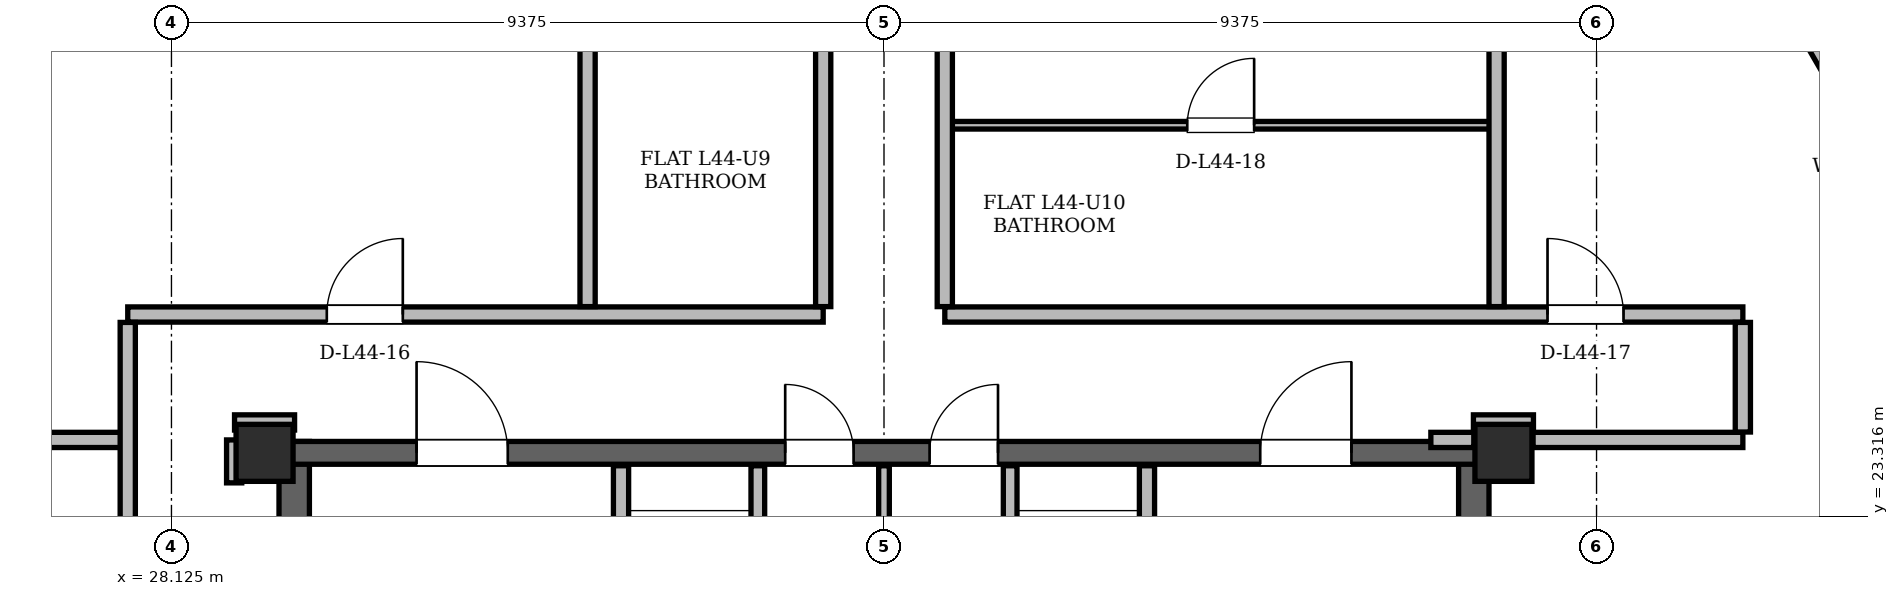
"""IFC4 building model, lengths in metres.
Left out: names, types, materials, properties, quantities, classifications, styles, units other than length and angle.
Written with IfcOpenShell. Run it as: python <this file> out.ifc"""

import sys

from ifc_helpers import new_model, si_unit, direction, frame, frame_2d, origin, origin_2d, place, context, subcontext, project, spatial, rectangle, hollow_rectangle, extrude, element, fill, save


model = new_model("IFC4")
c1 = context("Model", 3, precision=1e-05, world=origin(), true_north=direction((0.0, 1.0)))
c2 = subcontext(c1, "Body", "Model", "MODEL_VIEW")
j1 = project(units=[si_unit("LENGTHUNIT", "METRE"), si_unit("PLANEANGLEUNIT", "RADIAN")], contexts=[c1])
p1 = place(None, origin())
s1 = spatial("IfcSite", under=j1, at=p1, CompositionType="ELEMENT")
p2 = place(p1, origin())
s2 = spatial("IfcBuilding", under=s1, at=p2, CompositionType="ELEMENT")
p3 = place(p2, frame((0.0, 0.0, 167.4)))
s3 = spatial("IfcBuildingStorey", under=s2, at=p3, CompositionType="ELEMENT", Elevation=167.4)
for number, where, z_axis, x_axis in (
    (1, (45.65, 24.15, 0.0), (0.0, 0.0, 1.0), (1.0, 0.0, 0.0)),
    (2, (29.35, 24.15, 0.0), (0.0, 0.0, 1.0), (1.0, 0.0, 0.0)),
):
    element("IfcColumn", number, at=place(p3, frame(where, z_axis=z_axis, x_axis=x_axis)), inside=s3, PredefinedType="COLUMN", context=c2, shape_type="SweptSolid", body=[
        extrude(hollow_rectangle(XDim=0.75, YDim=0.75, WallThickness=0.06, at=origin_2d()), origin(), (0.0, 0.0, 1.0), 3.6),
    ])
for number, where, z_axis, x_axis in (
    (3, (29.74, 11.0, 0.0), (0.0, 0.0, 1.0), (0.0, 1.0, 0.0)),
    (4, (45.26, 11.0, 0.0), (0.0, 0.0, 1.0), (0.0, 1.0, 0.0)),
):
    element("IfcWall", number, at=place(p3, frame(where, z_axis=z_axis, x_axis=x_axis)), inside=s3, PredefinedType="SHEAR", context=c2, shape_type="SweptSolid", body=[
        extrude(rectangle(XDim=13.3, YDim=0.4, at=frame_2d((6.65, 0.0))), origin(), (0.0, 0.0, 1.0), 3.38),
    ])
p4 = place(p3, frame((29.65, 24.15, 0.0), z_axis=(0.0, 0.0, 1.0), x_axis=(1.0, 0.0, 0.0)))
e5 = element("IfcWall", 5, at=p4, inside=s3, PredefinedType="SHEAR", context=c2, shape_type="SweptSolid", body=[
    extrude(rectangle(XDim=15.7, YDim=0.3, at=frame_2d((7.85, 0.0))), origin(), (0.0, 0.0, 1.0), 3.38),
])
p5 = place(p4, frame((1.7, 0.0, 0.0)))
e6 = element("IfcOpeningElement", 6, at=p5, cuts=e5, PredefinedType="OPENING", context=c2, shape_type="SweptSolid", body=[
    extrude(rectangle(XDim=1.2, YDim=2.2, at=frame_2d((0.6, 1.1))), frame((0.0, 0.15, 0.0), z_axis=(0.0, -1.0, 0.0), x_axis=(1.0, 0.0, 0.0)), (0.0, 0.0, 1.0), 0.3),
])
p6 = place(p4, frame((12.8, 0.0, 0.0)))
e7 = element("IfcOpeningElement", 7, at=p6, cuts=e5, PredefinedType="OPENING", context=c2, shape_type="SweptSolid", body=[
    extrude(rectangle(XDim=1.2, YDim=2.2, at=frame_2d((0.6, 1.1))), frame((0.0, 0.15, 0.0), z_axis=(0.0, -1.0, 0.0), x_axis=(1.0, 0.0, 0.0)), (0.0, 0.0, 1.0), 0.3),
])
p7 = place(p4, frame((6.55, 0.0, 0.0)))
e8 = element("IfcOpeningElement", 8, at=p7, cuts=e5, PredefinedType="OPENING", context=c2, shape_type="SweptSolid", body=[
    extrude(rectangle(XDim=0.9, YDim=2.05, at=frame_2d((0.45, 1.025))), frame((0.0, 0.15, 0.0), z_axis=(0.0, -1.0, 0.0), x_axis=(1.0, 0.0, 0.0)), (0.0, 0.0, 1.0), 0.3),
])
p8 = place(p4, frame((8.45, 0.0, 0.0)))
e9 = element("IfcOpeningElement", 9, at=p8, cuts=e5, PredefinedType="OPENING", context=c2, shape_type="SweptSolid", body=[
    extrude(rectangle(XDim=0.9, YDim=2.05, at=frame_2d((0.45, 1.025))), frame((0.0, 0.15, 0.0), z_axis=(0.0, -1.0, 0.0), x_axis=(1.0, 0.0, 0.0)), (0.0, 0.0, 1.0), 0.3),
])
p9 = place(p3, frame((59.756, 12.279, 0.0), z_axis=(0.0, 0.0, 1.0), x_axis=(-0.499997523705, 0.86602683347, 0.0)))
e10 = element("IfcWall", 10, at=p9, inside=s3, PredefinedType="SOLIDWALL", context=c2, shape_type="SweptSolid", body=[
    extrude(rectangle(XDim=35.802, YDim=0.29, at=frame_2d((17.901, 0.0))), origin(), (0.0, 0.0, 1.0), 2.6),
])
p10 = place(p9, frame((6.579, 0.0, 0.0)))
e11 = element("IfcOpeningElement", 11, at=p10, cuts=e10, PredefinedType="OPENING", context=c2, shape_type="SweptSolid", body=[
    extrude(rectangle(XDim=1.5, YDim=2.2, at=frame_2d((0.75, 1.1))), frame((0.0, 0.145, 0.0), z_axis=(0.0, -1.0, 0.0), x_axis=(1.0, 0.0, 0.0)), (0.0, 0.0, 1.0), 0.29),
])
p11 = place(p9, frame((26.158, 0.0, 0.0)))
e12 = element("IfcOpeningElement", 12, at=p11, cuts=e10, PredefinedType="OPENING", context=c2, shape_type="SweptSolid", body=[
    extrude(rectangle(XDim=1.3, YDim=2.2, at=frame_2d((0.65, 1.1))), frame((0.0, 0.145, 0.0), z_axis=(0.0, -1.0, 0.0), x_axis=(1.0, 0.0, 0.0)), (0.0, 0.0, 1.0), 0.29),
])
p12 = place(p9, frame((1.25, 0.0, 0.85)))
e13 = element("IfcOpeningElement", 13, at=p12, cuts=e10, PredefinedType="OPENING", context=c2, shape_type="SweptSolid", body=[
    extrude(rectangle(XDim=1.2, YDim=1.48, at=frame_2d((0.6, 0.74))), frame((0.0, 0.145, 0.0), z_axis=(0.0, -1.0, 0.0), x_axis=(1.0, 0.0, 0.0)), (0.0, 0.0, 1.0), 0.29),
])
p13 = place(p9, frame((17.033, 0.0, 0.85)))
e14 = element("IfcOpeningElement", 14, at=p13, cuts=e10, PredefinedType="OPENING", context=c2, shape_type="SweptSolid", body=[
    extrude(rectangle(XDim=2.6, YDim=1.64, at=frame_2d((1.3, 0.82))), frame((0.0, 0.145, 0.0), z_axis=(0.0, -1.0, 0.0), x_axis=(1.0, 0.0, 0.0)), (0.0, 0.0, 1.0), 0.29),
])
p14 = place(p9, frame((21.982, 0.0, 0.85)))
e15 = element("IfcOpeningElement", 15, at=p14, cuts=e10, PredefinedType="OPENING", context=c2, shape_type="SweptSolid", body=[
    extrude(rectangle(XDim=2.0, YDim=1.64, at=frame_2d((1.0, 0.82))), frame((0.0, 0.145, 0.0), z_axis=(0.0, -1.0, 0.0), x_axis=(1.0, 0.0, 0.0)), (0.0, 0.0, 1.0), 0.29),
])
p15 = place(p9, frame((13.347, 0.0, 0.85)))
e16 = element("IfcOpeningElement", 16, at=p15, cuts=e10, PredefinedType="OPENING", context=c2, shape_type="SweptSolid", body=[
    extrude(rectangle(XDim=1.6, YDim=1.64, at=frame_2d((0.8, 0.82))), frame((0.0, 0.145, 0.0), z_axis=(0.0, -1.0, 0.0), x_axis=(1.0, 0.0, 0.0)), (0.0, 0.0, 1.0), 0.29),
])
p16 = place(p9, frame((31.619, 0.0, 0.85)))
e17 = element("IfcOpeningElement", 17, at=p16, cuts=e10, PredefinedType="OPENING", context=c2, shape_type="SweptSolid", body=[
    extrude(rectangle(XDim=2.6, YDim=1.64, at=frame_2d((1.3, 0.82))), frame((0.0, 0.145, 0.0), z_axis=(0.0, -1.0, 0.0), x_axis=(1.0, 0.0, 0.0)), (0.0, 0.0, 1.0), 0.29),
])
p17 = place(p3, frame((33.146, 43.285, 0.0), z_axis=(0.0, 0.0, 1.0), x_axis=(-0.499997523705, -0.86602683347, 0.0)))
e18 = element("IfcWall", 18, at=p17, inside=s3, PredefinedType="SOLIDWALL", context=c2, shape_type="SweptSolid", body=[
    extrude(rectangle(XDim=35.802, YDim=0.29, at=frame_2d((17.901, 0.0))), origin(), (0.0, 0.0, 1.0), 2.6),
])
p18 = place(p17, frame((6.76, 0.0, 0.0)))
e19 = element("IfcOpeningElement", 19, at=p18, cuts=e18, PredefinedType="OPENING", context=c2, shape_type="SweptSolid", body=[
    extrude(rectangle(XDim=1.0, YDim=2.18, at=frame_2d((0.5, 1.09))), frame((0.0, 0.145, 0.0), z_axis=(0.0, -1.0, 0.0), x_axis=(1.0, 0.0, 0.0)), (0.0, 0.0, 1.0), 0.29),
])
p19 = place(p17, frame((26.688, 0.0, 0.0)))
e20 = element("IfcOpeningElement", 20, at=p19, cuts=e18, PredefinedType="OPENING", context=c2, shape_type="SweptSolid", body=[
    extrude(rectangle(XDim=1.5, YDim=2.2, at=frame_2d((0.75, 1.1))), frame((0.0, 0.145, 0.0), z_axis=(0.0, -1.0, 0.0), x_axis=(1.0, 0.0, 0.0)), (0.0, 0.0, 1.0), 0.29),
])
p20 = place(p17, frame((33.698, 0.0, 0.85)))
e21 = element("IfcOpeningElement", 21, at=p20, cuts=e18, PredefinedType="OPENING", context=c2, shape_type="SweptSolid", body=[
    extrude(rectangle(XDim=1.2, YDim=1.48, at=frame_2d((0.6, 0.74))), frame((0.0, 0.145, 0.0), z_axis=(0.0, -1.0, 0.0), x_axis=(1.0, 0.0, 0.0)), (0.0, 0.0, 1.0), 0.29),
])
p21 = place(p17, frame((22.123, 0.0, 0.85)))
e22 = element("IfcOpeningElement", 22, at=p21, cuts=e18, PredefinedType="OPENING", context=c2, shape_type="SweptSolid", body=[
    extrude(rectangle(XDim=1.2, YDim=1.48, at=frame_2d((0.6, 0.74))), frame((0.0, 0.145, 0.0), z_axis=(0.0, -1.0, 0.0), x_axis=(1.0, 0.0, 0.0)), (0.0, 0.0, 1.0), 0.29),
])
p22 = place(p17, frame((12.284, 0.0, 0.85)))
e23 = element("IfcOpeningElement", 23, at=p22, cuts=e18, PredefinedType="OPENING", context=c2, shape_type="SweptSolid", body=[
    extrude(rectangle(XDim=1.6, YDim=1.64, at=frame_2d((0.8, 0.82))), frame((0.0, 0.145, 0.0), z_axis=(0.0, -1.0, 0.0), x_axis=(1.0, 0.0, 0.0)), (0.0, 0.0, 1.0), 0.29),
])
p23 = place(p17, frame((17.539, 0.0, 0.85)))
e24 = element("IfcOpeningElement", 24, at=p23, cuts=e18, PredefinedType="OPENING", context=c2, shape_type="SweptSolid", body=[
    extrude(rectangle(XDim=3.0, YDim=1.64, at=frame_2d((1.5, 0.82))), frame((0.0, 0.145, 0.0), z_axis=(0.0, -1.0, 0.0), x_axis=(1.0, 0.0, 0.0)), (0.0, 0.0, 1.0), 0.29),
])
p24 = place(p17, frame((1.23, 0.0, 0.85)))
e25 = element("IfcOpeningElement", 25, at=p24, cuts=e18, PredefinedType="OPENING", context=c2, shape_type="SweptSolid", body=[
    extrude(rectangle(XDim=1.2, YDim=1.48, at=frame_2d((0.6, 0.74))), frame((0.0, 0.145, 0.0), z_axis=(0.0, -1.0, 0.0), x_axis=(1.0, 0.0, 0.0)), (0.0, 0.0, 1.0), 0.29),
])
p25 = place(p17, frame((30.487, 0.0, 0.85)))
e26 = element("IfcOpeningElement", 26, at=p25, cuts=e18, PredefinedType="OPENING", context=c2, shape_type="SweptSolid", body=[
    extrude(rectangle(XDim=1.2, YDim=1.48, at=frame_2d((0.6, 0.74))), frame((0.0, 0.145, 0.0), z_axis=(0.0, -1.0, 0.0), x_axis=(1.0, 0.0, 0.0)), (0.0, 0.0, 1.0), 0.29),
])
p26 = place(p3, frame((34.04, 19.48, 0.0), z_axis=(0.0, 0.0, 1.0), x_axis=(0.0, 1.0, 0.0)))
e27 = element("IfcWall", 27, at=p26, inside=s3, PredefinedType="PARTITIONING", context=c2, shape_type="SweptSolid", body=[
    extrude(rectangle(XDim=4.5, YDim=0.2, at=frame_2d((2.25, 0.0))), origin(), (0.0, 0.0, 1.0), 3.38),
])
p27 = place(p26, frame((2.12, 0.0, 0.0)))
e28 = element("IfcOpeningElement", 28, at=p27, cuts=e27, PredefinedType="OPENING", context=c2, shape_type="SweptSolid", body=[
    extrude(rectangle(XDim=1.1, YDim=2.2, at=frame_2d((0.55, 1.1))), frame((0.0, 0.1, 0.0), z_axis=(0.0, -1.0, 0.0), x_axis=(1.0, 0.0, 0.0)), (0.0, 0.0, 1.0), 0.2),
])
p28 = place(p3, frame((35.84, 20.96, 0.0), z_axis=(0.0, 0.0, 1.0), x_axis=(0.0, 1.0, 0.0)))
e29 = element("IfcWall", 29, at=p28, inside=s3, PredefinedType="PARTITIONING", context=c2, shape_type="SweptSolid", body=[
    extrude(rectangle(XDim=3.02, YDim=0.18, at=frame_2d((1.51, 0.0))), origin(), (0.0, 0.0, 1.0), 3.38),
])
p29 = place(p3, frame((40.96, 19.48, 0.0), z_axis=(0.0, 0.0, 1.0), x_axis=(0.0, 1.0, 0.0)))
e30 = element("IfcWall", 30, at=p29, inside=s3, PredefinedType="PARTITIONING", context=c2, shape_type="SweptSolid", body=[
    extrude(rectangle(XDim=4.5, YDim=0.2, at=frame_2d((2.25, 0.0))), origin(), (0.0, 0.0, 1.0), 3.38),
])
p30 = place(p29, frame((2.12, 0.0, 0.0)))
e31 = element("IfcOpeningElement", 31, at=p30, cuts=e30, PredefinedType="OPENING", context=c2, shape_type="SweptSolid", body=[
    extrude(rectangle(XDim=1.1, YDim=2.2, at=frame_2d((0.55, 1.1))), frame((0.0, 0.1, 0.0), z_axis=(0.0, -1.0, 0.0), x_axis=(1.0, 0.0, 0.0)), (0.0, 0.0, 1.0), 0.2),
])
p31 = place(p3, frame((39.16, 20.96, 0.0), z_axis=(0.0, 0.0, 1.0), x_axis=(0.0, 1.0, 0.0)))
e32 = element("IfcWall", 32, at=p31, inside=s3, PredefinedType="PARTITIONING", context=c2, shape_type="SweptSolid", body=[
    extrude(rectangle(XDim=3.02, YDim=0.18, at=frame_2d((1.51, 0.0))), origin(), (0.0, 0.0, 1.0), 3.38),
])
p32 = place(p3, frame((37.5, 21.06, 0.0), z_axis=(0.0, 0.0, 1.0), x_axis=(0.0, 1.0, 0.0)))
e33 = element("IfcWall", 33, at=p32, inside=s3, PredefinedType="PARTITIONING", context=c2, shape_type="SweptSolid", body=[
    extrude(rectangle(XDim=2.92, YDim=0.14, at=frame_2d((1.46, 0.0))), origin(), (0.0, 0.0, 1.0), 3.38),
])
p33 = place(p3, frame((22.368, 24.32, 0.0), z_axis=(0.0, 0.0, 1.0), x_axis=(1.0, 0.0, 0.0)))
e34 = element("IfcWall", 34, at=p33, inside=s3, PredefinedType="PARTITIONING", context=c2, shape_type="SweptSolid", body=[
    extrude(rectangle(XDim=5.182, YDim=0.2, at=frame_2d((2.591, 0.0))), origin(), (0.0, 0.0, 1.0), 3.38),
])
p34 = place(p3, frame((44.695, 24.32, 0.0), z_axis=(0.0, 0.0, 1.0), x_axis=(1.0, 0.0, 0.0)))
e35 = element("IfcWall", 35, at=p34, inside=s3, PredefinedType="PARTITIONING", context=c2, shape_type="SweptSolid", body=[
    extrude(rectangle(XDim=0.565, YDim=0.2, at=frame_2d((0.282, 0.0))), origin(), (0.0, 0.0, 1.0), 2.52),
])
p35 = place(p3, frame((46.04, 24.32, 0.0), z_axis=(0.0, 0.0, 1.0), x_axis=(1.0, 0.0, 0.0)))
e36 = element("IfcWall", 36, at=p35, inside=s3, PredefinedType="PARTITIONING", context=c2, shape_type="SweptSolid", body=[
    extrude(rectangle(XDim=2.76, YDim=0.2, at=frame_2d((1.38, 0.0))), origin(), (0.0, 0.0, 1.0), 3.38),
])
for number, where, z_axis, x_axis in (
    (37, (28.955, 24.55, 0.0), (0.0, 0.0, 1.0), (1.0, 0.0, 0.0)),
    (38, (45.255, 24.55, 0.0), (0.0, 0.0, 1.0), (1.0, 0.0, 0.0)),
):
    element("IfcWall", number, at=place(p3, frame(where, z_axis=z_axis, x_axis=x_axis)), inside=s3, PredefinedType="PARTITIONING", context=c2, shape_type="SweptSolid", body=[
        extrude(rectangle(XDim=0.79, YDim=0.2, at=frame_2d((0.395, 0.0))), origin(), (0.0, 0.0, 1.0), 2.842),
    ])
p36 = place(p3, frame((27.55, 25.97, 0.0), z_axis=(0.0, 0.0, 1.0), x_axis=(1.0, 0.0, 0.0)))
e39 = element("IfcWall", 39, at=p36, inside=s3, PredefinedType="PARTITIONING", context=c2, shape_type="SweptSolid", body=[
    extrude(rectangle(XDim=9.15, YDim=0.2, at=frame_2d((4.575, 0.0))), origin(), (0.0, 0.0, 1.0), 2.842),
])
p37 = place(p36, frame((2.619, 0.0, 0.0)))
e40 = element("IfcOpeningElement", 40, at=p37, cuts=e39, PredefinedType="OPENING", context=c2, shape_type="SweptSolid", body=[
    extrude(rectangle(XDim=1.0, YDim=2.18, at=frame_2d((0.5, 1.09))), frame((0.0, 0.1, 0.0), z_axis=(0.0, -1.0, 0.0), x_axis=(1.0, 0.0, 0.0)), (0.0, 0.0, 1.0), 0.2),
])
p38 = place(p3, frame((38.3, 25.97, 0.0), z_axis=(0.0, 0.0, 1.0), x_axis=(1.0, 0.0, 0.0)))
e41 = element("IfcWall", 41, at=p38, inside=s3, PredefinedType="PARTITIONING", context=c2, shape_type="SweptSolid", body=[
    extrude(rectangle(XDim=10.5, YDim=0.2, at=frame_2d((5.25, 0.0))), origin(), (0.0, 0.0, 1.0), 2.842),
])
p39 = place(p38, frame((7.93, 0.0, 0.0)))
e42 = element("IfcOpeningElement", 42, at=p39, cuts=e41, PredefinedType="OPENING", context=c2, shape_type="SweptSolid", body=[
    extrude(rectangle(XDim=1.0, YDim=2.18, at=frame_2d((0.5, 1.09))), frame((0.0, 0.1, 0.0), z_axis=(0.0, -1.0, 0.0), x_axis=(1.0, 0.0, 0.0)), (0.0, 0.0, 1.0), 0.2),
])
p40 = place(p3, frame((38.218, 28.46, 0.0), z_axis=(0.0, 0.0, 1.0), x_axis=(1.0, 0.0, 0.0)))
e43 = element("IfcWall", 43, at=p40, inside=s3, PredefinedType="PARTITIONING", context=c2, shape_type="SweptSolid", body=[
    extrude(rectangle(XDim=7.424, YDim=0.1, at=frame_2d((3.712, 0.0))), origin(), (0.0, 0.0, 1.0), 3.38),
])
p41 = place(p40, frame((3.272, 0.0, 0.0)))
e44 = element("IfcOpeningElement", 44, at=p41, cuts=e43, PredefinedType="OPENING", context=c2, shape_type="SweptSolid", body=[
    extrude(rectangle(XDim=0.88, YDim=2.08, at=frame_2d((0.44, 1.04))), frame((0.0, 0.05, 0.0), z_axis=(0.0, -1.0, 0.0), x_axis=(1.0, 0.0, 0.0)), (0.0, 0.0, 1.0), 0.1),
])
p42 = place(p3, frame((27.55, 18.554, 0.0), z_axis=(0.0, 0.0, 1.0), x_axis=(0.0, 1.0, 0.0)))
e45 = element("IfcWall", 45, at=p42, inside=s3, PredefinedType="PARTITIONING", context=c2, shape_type="SweptSolid", body=[
    extrude(rectangle(XDim=7.312, YDim=0.2, at=frame_2d((3.656, 0.0))), origin(), (0.0, 0.0, 1.0), 3.38),
])
p43 = place(p42, frame((2.257, 0.0, 0.0)))
e46 = element("IfcOpeningElement", 46, at=p43, cuts=e45, PredefinedType="OPENING", context=c2, shape_type="SweptSolid", body=[
    extrude(rectangle(XDim=1.0, YDim=2.18, at=frame_2d((0.5, 1.09))), frame((0.0, 0.1, 0.0), z_axis=(0.0, -1.0, 0.0), x_axis=(1.0, 0.0, 0.0)), (0.0, 0.0, 1.0), 0.2),
])
p44 = place(p3, frame((28.95, 23.755, 0.0), z_axis=(0.0, 0.0, 1.0), x_axis=(0.0, 1.0, 0.0)))
e47 = element("IfcWall", 47, at=p44, inside=s3, PredefinedType="PARTITIONING", context=c2, shape_type="SweptSolid", body=[
    extrude(rectangle(XDim=0.565, YDim=0.2, at=frame_2d((0.283, 0.0))), origin(), (0.0, 0.0, 1.0), 3.38),
])
p45 = place(p3, frame((33.6, 26.074, 0.0), z_axis=(0.0, 0.0, 1.0), x_axis=(0.0, 1.0, 0.0)))
e48 = element("IfcWall", 48, at=p45, inside=s3, PredefinedType="PARTITIONING", context=c2, shape_type="SweptSolid", body=[
    extrude(rectangle(XDim=17.062, YDim=0.2, at=frame_2d((8.531, 0.0))), origin(), (0.0, 0.0, 1.0), 3.38),
])
p46 = place(p3, frame((36.7, 26.074, 0.0), z_axis=(0.0, 0.0, 1.0), x_axis=(0.0, 1.0, 0.0)))
e49 = element("IfcWall", 49, at=p46, inside=s3, PredefinedType="PARTITIONING", context=c2, shape_type="SweptSolid", body=[
    extrude(rectangle(XDim=17.062, YDim=0.2, at=frame_2d((8.531, 0.0))), origin(), (0.0, 0.0, 1.0), 3.38),
])
p47 = place(p46, frame((4.893, 0.0, 0.0)))
e50 = element("IfcOpeningElement", 50, at=p47, cuts=e49, PredefinedType="OPENING", context=c2, shape_type="SweptSolid", body=[
    extrude(rectangle(XDim=1.0, YDim=2.18, at=frame_2d((0.5, 1.09))), frame((0.0, 0.1, 0.0), z_axis=(0.0, -1.0, 0.0), x_axis=(1.0, 0.0, 0.0)), (0.0, 0.0, 1.0), 0.2),
])
p48 = place(p3, frame((38.3, 26.074, 0.0), z_axis=(0.0, 0.0, 1.0), x_axis=(0.0, 1.0, 0.0)))
e51 = element("IfcWall", 51, at=p48, inside=s3, PredefinedType="PARTITIONING", context=c2, shape_type="SweptSolid", body=[
    extrude(rectangle(XDim=6.022, YDim=0.2, at=frame_2d((3.011, 0.0))), origin(), (0.0, 0.0, 1.0), 3.38),
])
p49 = place(p48, frame((3.661, 0.0, 0.0)))
e52 = element("IfcOpeningElement", 52, at=p49, cuts=e51, PredefinedType="OPENING", context=c2, shape_type="SweptSolid", body=[
    extrude(rectangle(XDim=1.0, YDim=2.18, at=frame_2d((0.5, 1.09))), frame((0.0, 0.1, 0.0), z_axis=(0.0, -1.0, 0.0), x_axis=(1.0, 0.0, 0.0)), (0.0, 0.0, 1.0), 0.2),
])
p50 = place(p3, frame((45.56, 26.074, 0.0), z_axis=(0.0, 0.0, 1.0), x_axis=(0.0, 1.0, 0.0)))
e53 = element("IfcWall", 53, at=p50, inside=s3, PredefinedType="PARTITIONING", context=c2, shape_type="SweptSolid", body=[
    extrude(rectangle(XDim=10.494, YDim=0.2, at=frame_2d((5.247, 0.0))), origin(), (0.0, 0.0, 1.0), 2.6),
])
p51 = place(p3, frame((48.8, 24.424, 0.0), z_axis=(0.0, 0.0, 1.0), x_axis=(0.0, 1.0, 0.0)))
e54 = element("IfcWall", 54, at=p51, inside=s3, PredefinedType="PARTITIONING", context=c2, shape_type="SweptSolid", body=[
    extrude(rectangle(XDim=1.442, YDim=0.2, at=frame_2d((0.721, 0.0))), origin(), (0.0, 0.0, 1.0), 3.38),
])
p52 = place(p5, origin())
e55 = element("IfcDoor", 55, at=p52, inside=s3, OperationType="SINGLE_SWING_LEFT", PredefinedType="DOOR", context=c2, shape_type="SweptSolid", body=[
    extrude(rectangle(XDim=1.2, YDim=2.2, at=frame_2d((0.6, 1.1))), frame((0.0, 0.025, 0.0), z_axis=(0.0, -1.0, 0.0), x_axis=(1.0, 0.0, 0.0)), (0.0, 0.0, 1.0), 0.05),
])
fill(e6, e55)
p53 = place(p6, origin())
e56 = element("IfcDoor", 56, at=p53, inside=s3, OperationType="SINGLE_SWING_RIGHT", PredefinedType="DOOR", context=c2, shape_type="SweptSolid", body=[
    extrude(rectangle(XDim=1.2, YDim=2.2, at=frame_2d((0.6, 1.1))), frame((0.0, 0.025, 0.0), z_axis=(0.0, -1.0, 0.0), x_axis=(1.0, 0.0, 0.0)), (0.0, 0.0, 1.0), 0.05),
])
fill(e7, e56)
p54 = place(p7, origin())
e57 = element("IfcDoor", 57, at=p54, inside=s3, OperationType="SINGLE_SWING_LEFT", PredefinedType="DOOR", context=c2, shape_type="SweptSolid", body=[
    extrude(rectangle(XDim=0.9, YDim=2.05, at=frame_2d((0.45, 1.025))), frame((0.0, 0.025, 0.0), z_axis=(0.0, -1.0, 0.0), x_axis=(1.0, 0.0, 0.0)), (0.0, 0.0, 1.0), 0.05),
])
fill(e8, e57)
p55 = place(p8, origin())
e58 = element("IfcDoor", 58, at=p55, inside=s3, OperationType="SINGLE_SWING_RIGHT", PredefinedType="DOOR", context=c2, shape_type="SweptSolid", body=[
    extrude(rectangle(XDim=0.9, YDim=2.05, at=frame_2d((0.45, 1.025))), frame((0.0, 0.025, 0.0), z_axis=(0.0, -1.0, 0.0), x_axis=(1.0, 0.0, 0.0)), (0.0, 0.0, 1.0), 0.05),
])
fill(e9, e58)
p56 = place(p37, origin())
e59 = element("IfcDoor", 59, at=p56, inside=s3, OperationType="SINGLE_SWING_RIGHT", PredefinedType="DOOR", context=c2, shape_type="SweptSolid", body=[
    extrude(rectangle(XDim=1.0, YDim=2.18, at=frame_2d((0.5, 1.09))), frame((0.0, 0.025, 0.0), z_axis=(0.0, -1.0, 0.0), x_axis=(1.0, 0.0, 0.0)), (0.0, 0.0, 1.0), 0.05),
])
fill(e40, e59)
p57 = place(p39, origin())
e60 = element("IfcDoor", 60, at=p57, inside=s3, OperationType="SINGLE_SWING_LEFT", PredefinedType="DOOR", context=c2, shape_type="SweptSolid", body=[
    extrude(rectangle(XDim=1.0, YDim=2.18, at=frame_2d((0.5, 1.09))), frame((0.0, 0.025, 0.0), z_axis=(0.0, -1.0, 0.0), x_axis=(1.0, 0.0, 0.0)), (0.0, 0.0, 1.0), 0.05),
])
fill(e42, e60)
p58 = place(p41, origin())
e61 = element("IfcDoor", 61, at=p58, inside=s3, OperationType="SINGLE_SWING_RIGHT", PredefinedType="DOOR", context=c2, shape_type="SweptSolid", body=[
    extrude(rectangle(XDim=0.88, YDim=2.08, at=frame_2d((0.44, 1.04))), frame((0.0, 0.025, 0.0), z_axis=(0.0, -1.0, 0.0), x_axis=(1.0, 0.0, 0.0)), (0.0, 0.0, 1.0), 0.05),
])
fill(e44, e61)
save(model, sys.argv[1])
